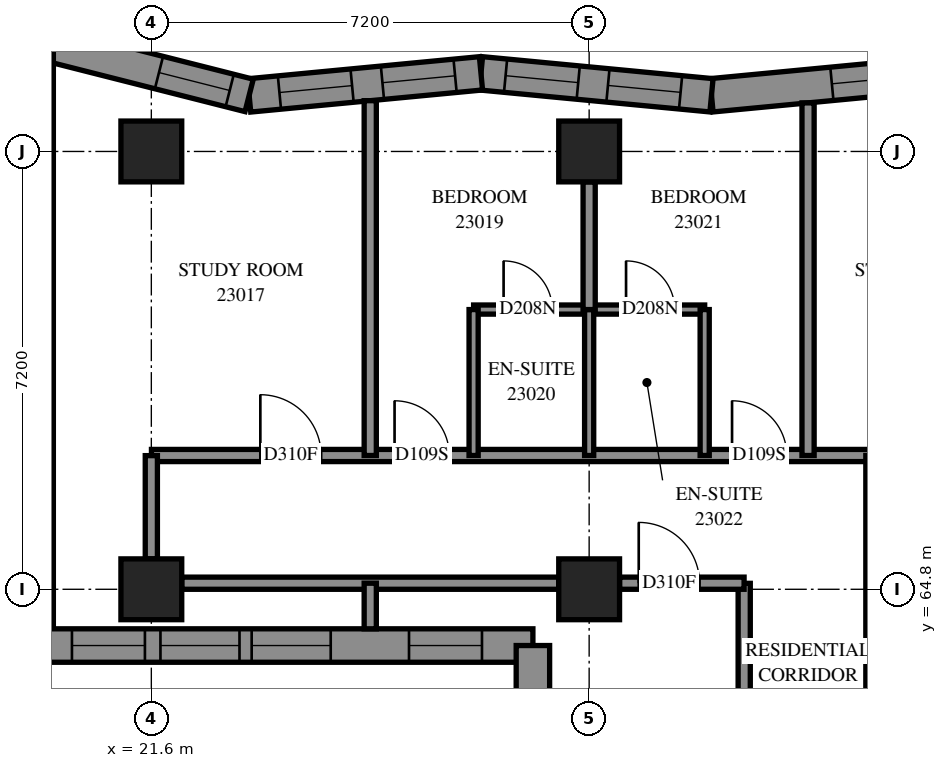
"""IFC4 building model, lengths in metres.
Left out: names, types, materials, properties, quantities, classifications, styles, units other than length and angle.
Written with IfcOpenShell. Run it as: python <this file> out.ifc"""

import sys

from ifc_helpers import new_model, si_unit, direction, frame, frame_2d, origin, origin_2d, place, context, subcontext, project, spatial, polyline, rectangle, outline, extrude, element, fill, save


model = new_model("IFC4")
c1 = context("Model", 3, precision=1e-05, world=origin(), true_north=direction((0.0, 1.0)))
c2 = subcontext(c1, "Body", "Model", "MODEL_VIEW")
j1 = project(units=[si_unit("LENGTHUNIT", "METRE"), si_unit("PLANEANGLEUNIT", "RADIAN")], contexts=[c1])
p1 = place(None, origin())
s1 = spatial("IfcSite", under=j1, at=p1, CompositionType="ELEMENT")
p2 = place(p1, origin())
s2 = spatial("IfcBuilding", under=s1, at=p2, CompositionType="ELEMENT")
p3 = place(p2, frame((0.0, 0.0, 88.0)))
s3 = spatial("IfcBuildingStorey", under=s2, at=p3, CompositionType="ELEMENT", Elevation=88.0)
for number, where, z_axis, x_axis in (
    (1, (21.6, 64.8, 0.0), (0.0, 0.0, 1.0), (1.0, 0.0, 0.0)),
    (2, (21.6, 72.0, 0.0), (0.0, 0.0, 1.0), (1.0, 0.0, 0.0)),
    (3, (28.8, 64.8, 0.0), (0.0, 0.0, 1.0), (1.0, 0.0, 0.0)),
    (4, (28.8, 72.0, 0.0), (0.0, 0.0, 1.0), (1.0, 0.0, 0.0)),
):
    element("IfcColumn", number, at=place(p3, frame(where, z_axis=z_axis, x_axis=x_axis)), inside=s3, PredefinedType="COLUMN", context=c2, shape_type="SweptSolid", body=[
        extrude(rectangle(XDim=1.0, YDim=1.0, at=origin_2d()), origin(), (0.0, 0.0, 1.0), 3.1),
    ])
p4 = place(p3, frame((34.603, 73.285, 0.0), z_axis=(0.0, 0.0, 1.0), x_axis=(-0.9954966527, -0.0947967005, 0.0)))
e5 = element("IfcWall", 5, at=p4, inside=s3, PredefinedType="SOLIDWALL", context=c2, shape_type="SweptSolid", body=[
    extrude(outline(polyline([(-0.026, -0.275), (3.782, -0.275), (3.834, 0.275), (0.026, 0.275), (-0.026, -0.275)])), origin(), (0.0, 0.0, 1.0), 3.1),
])
p5 = place(p4, frame((0.62, 0.0, 0.5)))
e6 = element("IfcOpeningElement", 6, at=p5, cuts=e5, PredefinedType="OPENING", context=c2, shape_type="SweptSolid", body=[
    extrude(rectangle(XDim=1.2, YDim=2.45, at=frame_2d((0.6, 1.225))), frame((0.0, 0.285, 0.0), z_axis=(0.0, -1.0, 0.0), x_axis=(1.0, 0.0, 0.0)), (0.0, 0.0, 1.0), 0.57),
])
p6 = place(p3, frame((30.812, 72.924, 0.0), z_axis=(0.0, 0.0, 1.0), x_axis=(-0.9954966527, 0.0947967005, 0.0)))
e7 = element("IfcWall", 7, at=p6, inside=s3, PredefinedType="SOLIDWALL", context=c2, shape_type="SweptSolid", body=[
    extrude(outline(polyline([(0.026, -0.275), (3.834, -0.275), (3.782, 0.275), (-0.026, 0.275), (0.026, -0.275)])), origin(), (0.0, 0.0, 1.0), 3.1),
])
p7 = place(p6, frame((0.511, 0.0, 0.5)))
e8 = element("IfcOpeningElement", 8, at=p7, cuts=e7, PredefinedType="OPENING", context=c2, shape_type="SweptSolid", body=[
    extrude(rectangle(XDim=1.2, YDim=2.45, at=frame_2d((0.6, 1.225))), frame((0.0, 0.285, 0.0), z_axis=(0.0, -1.0, 0.0), x_axis=(1.0, 0.0, 0.0)), (0.0, 0.0, 1.0), 0.57),
])
p8 = place(p6, frame((2.202, 0.0, 0.5)))
e9 = element("IfcOpeningElement", 9, at=p8, cuts=e7, PredefinedType="OPENING", context=c2, shape_type="SweptSolid", body=[
    extrude(rectangle(XDim=1.2, YDim=2.45, at=frame_2d((0.6, 1.225))), frame((0.0, 0.285, 0.0), z_axis=(0.0, -1.0, 0.0), x_axis=(1.0, 0.0, 0.0)), (0.0, 0.0, 1.0), 0.57),
])
p9 = place(p3, frame((27.021, 73.285, 0.0), z_axis=(0.0, 0.0, 1.0), x_axis=(-0.9954951205, -0.0948127894, 0.0)))
e10 = element("IfcWall", 10, at=p9, inside=s3, PredefinedType="SOLIDWALL", context=c2, shape_type="SweptSolid", body=[
    extrude(outline(polyline([(-0.026, -0.275), (3.782, -0.275), (3.877, 0.275), (0.026, 0.275), (-0.026, -0.275)])), origin(), (0.0, 0.0, 1.0), 3.1),
])
p10 = place(p9, frame((0.428, 0.0, 0.5)))
e11 = element("IfcOpeningElement", 11, at=p10, cuts=e10, PredefinedType="OPENING", context=c2, shape_type="SweptSolid", body=[
    extrude(rectangle(XDim=1.2, YDim=2.45, at=frame_2d((0.6, 1.225))), frame((0.0, 0.285, 0.0), z_axis=(0.0, -1.0, 0.0), x_axis=(1.0, 0.0, 0.0)), (0.0, 0.0, 1.0), 0.57),
])
p11 = place(p9, frame((2.129, 0.0, 0.5)))
e12 = element("IfcOpeningElement", 12, at=p11, cuts=e10, PredefinedType="OPENING", context=c2, shape_type="SweptSolid", body=[
    extrude(rectangle(XDim=1.2, YDim=2.45, at=frame_2d((0.6, 1.225))), frame((0.0, 0.285, 0.0), z_axis=(0.0, -1.0, 0.0), x_axis=(1.0, 0.0, 0.0)), (0.0, 0.0, 1.0), 0.57),
])
p12 = place(p3, frame((23.209, 72.922, 0.0), z_axis=(0.0, 0.0, 1.0), x_axis=(-0.9693377173, 0.2457323539, 0.0)))
e13 = element("IfcWall", 13, at=p12, inside=s3, PredefinedType="SOLIDWALL", context=c2, shape_type="SweptSolid", body=[
    extrude(outline(polyline([(0.048, -0.275), (3.959, -0.275), (3.252, 0.275), (-0.048, 0.275), (0.048, -0.275)])), origin(), (0.0, 0.0, 1.0), 3.1),
])
p13 = place(p12, frame((0.33, 0.0, 0.5)))
e14 = element("IfcOpeningElement", 14, at=p13, cuts=e13, PredefinedType="OPENING", context=c2, shape_type="SweptSolid", body=[
    extrude(rectangle(XDim=1.2, YDim=2.45, at=frame_2d((0.6, 1.225))), frame((0.0, 0.285, 0.0), z_axis=(0.0, -1.0, 0.0), x_axis=(1.0, 0.0, 0.0)), (0.0, 0.0, 1.0), 0.57),
])
p14 = place(p3, frame((19.714, 73.808, 0.0), z_axis=(0.0, 0.0, 1.0), x_axis=(0.0, -1.0, 0.0)))
e15 = element("IfcWall", 15, at=p14, inside=s3, PredefinedType="SOLIDWALL", context=c2, shape_type="SweptSolid", body=[
    extrude(outline(polyline([(-0.353, -0.275), (10.208, -0.275), (9.658, 0.275), (0.353, 0.275), (-0.353, -0.275)])), origin(), (0.0, 0.0, 1.0), 3.1),
])
p15 = place(p14, frame((2.208, 0.0, 0.5)))
e16 = element("IfcOpeningElement", 16, at=p15, cuts=e15, PredefinedType="OPENING", context=c2, shape_type="SweptSolid", body=[
    extrude(rectangle(XDim=1.3, YDim=2.45, at=frame_2d((0.65, 1.225))), frame((0.0, 0.285, 0.0), z_axis=(0.0, -1.0, 0.0), x_axis=(1.0, 0.0, 0.0)), (0.0, 0.0, 1.0), 0.57),
])
p16 = place(p14, frame((3.708, 0.0, 0.5)))
e17 = element("IfcOpeningElement", 17, at=p16, cuts=e15, PredefinedType="OPENING", context=c2, shape_type="SweptSolid", body=[
    extrude(rectangle(XDim=1.3, YDim=2.45, at=frame_2d((0.65, 1.225))), frame((0.0, 0.285, 0.0), z_axis=(0.0, -1.0, 0.0), x_axis=(1.0, 0.0, 0.0)), (0.0, 0.0, 1.0), 0.57),
])
p17 = place(p14, frame((5.958, 0.0, 0.5)))
e18 = element("IfcOpeningElement", 18, at=p17, cuts=e15, PredefinedType="OPENING", context=c2, shape_type="SweptSolid", body=[
    extrude(rectangle(XDim=1.3, YDim=2.45, at=frame_2d((0.65, 1.225))), frame((0.0, 0.285, 0.0), z_axis=(0.0, -1.0, 0.0), x_axis=(1.0, 0.0, 0.0)), (0.0, 0.0, 1.0), 0.57),
])
p18 = place(p14, frame((7.458, 0.0, 0.5)))
e19 = element("IfcOpeningElement", 19, at=p18, cuts=e15, PredefinedType="OPENING", context=c2, shape_type="SweptSolid", body=[
    extrude(rectangle(XDim=1.3, YDim=2.45, at=frame_2d((0.65, 1.225))), frame((0.0, 0.285, 0.0), z_axis=(0.0, -1.0, 0.0), x_axis=(1.0, 0.0, 0.0)), (0.0, 0.0, 1.0), 0.57),
])
p19 = place(p3, frame((19.714, 63.875, 0.0), z_axis=(0.0, 0.0, 1.0), x_axis=(1.0, 0.0, 0.0)))
e20 = element("IfcWall", 20, at=p19, inside=s3, PredefinedType="SOLIDWALL", context=c2, shape_type="SweptSolid", body=[
    extrude(outline(polyline([(-0.275, -0.275), (7.886, -0.275), (8.436, 0.275), (0.275, 0.275), (-0.275, -0.275)])), origin(), (0.0, 0.0, 1.0), 3.1),
])
p20 = place(p19, frame((2.036, 0.0, 0.5)))
e21 = element("IfcOpeningElement", 21, at=p20, cuts=e20, PredefinedType="OPENING", context=c2, shape_type="SweptSolid", body=[
    extrude(rectangle(XDim=1.3, YDim=2.45, at=frame_2d((0.65, 1.225))), frame((0.0, 0.285, 0.0), z_axis=(0.0, -1.0, 0.0), x_axis=(1.0, 0.0, 0.0)), (0.0, 0.0, 1.0), 0.57),
])
p21 = place(p19, frame((3.536, 0.0, 0.5)))
e22 = element("IfcOpeningElement", 22, at=p21, cuts=e20, PredefinedType="OPENING", context=c2, shape_type="SweptSolid", body=[
    extrude(rectangle(XDim=1.3, YDim=2.45, at=frame_2d((0.65, 1.225))), frame((0.0, 0.285, 0.0), z_axis=(0.0, -1.0, 0.0), x_axis=(1.0, 0.0, 0.0)), (0.0, 0.0, 1.0), 0.57),
])
p22 = place(p19, frame((0.581, 0.0, 0.5)))
e23 = element("IfcOpeningElement", 23, at=p22, cuts=e20, PredefinedType="OPENING", context=c2, shape_type="SweptSolid", body=[
    extrude(rectangle(XDim=1.2, YDim=2.45, at=frame_2d((0.6, 1.225))), frame((0.0, 0.285, 0.0), z_axis=(0.0, -1.0, 0.0), x_axis=(1.0, 0.0, 0.0)), (0.0, 0.0, 1.0), 0.57),
])
p23 = place(p19, frame((6.123, 0.0, 0.5)))
e24 = element("IfcOpeningElement", 24, at=p23, cuts=e20, PredefinedType="OPENING", context=c2, shape_type="SweptSolid", body=[
    extrude(rectangle(XDim=1.2, YDim=2.45, at=frame_2d((0.6, 1.225))), frame((0.0, 0.285, 0.0), z_axis=(0.0, -1.0, 0.0), x_axis=(1.0, 0.0, 0.0)), (0.0, 0.0, 1.0), 0.57),
])
p24 = place(p3, frame((27.875, 63.875, 0.0), z_axis=(0.0, 0.0, 1.0), x_axis=(0.0, -1.0, 0.0)))
e25 = element("IfcWall", 25, at=p24, inside=s3, PredefinedType="SOLIDWALL", context=c2, shape_type="SweptSolid", body=[
    extrude(outline(polyline([(0.275, -0.275), (8.436, -0.275), (7.886, 0.275), (-0.275, 0.275), (0.275, -0.275)])), origin(), (0.0, 0.0, 1.0), 3.1),
])
p25 = place(p24, frame((4.825, 0.0, 0.5)))
e26 = element("IfcOpeningElement", 26, at=p25, cuts=e25, PredefinedType="OPENING", context=c2, shape_type="SweptSolid", body=[
    extrude(rectangle(XDim=1.3, YDim=2.45, at=frame_2d((0.65, 1.225))), frame((0.0, 0.285, 0.0), z_axis=(0.0, -1.0, 0.0), x_axis=(1.0, 0.0, 0.0)), (0.0, 0.0, 1.0), 0.57),
])
p26 = place(p24, frame((1.738, 0.0, 0.5)))
e27 = element("IfcOpeningElement", 27, at=p26, cuts=e25, PredefinedType="OPENING", context=c2, shape_type="SweptSolid", body=[
    extrude(rectangle(XDim=1.2, YDim=2.45, at=frame_2d((0.6, 1.225))), frame((0.0, 0.285, 0.0), z_axis=(0.0, -1.0, 0.0), x_axis=(1.0, 0.0, 0.0)), (0.0, 0.0, 1.0), 0.57),
])
p27 = place(p24, frame((6.38, 0.0, 0.5)))
e28 = element("IfcOpeningElement", 28, at=p27, cuts=e25, PredefinedType="OPENING", context=c2, shape_type="SweptSolid", body=[
    extrude(rectangle(XDim=1.2, YDim=2.45, at=frame_2d((0.6, 1.225))), frame((0.0, 0.285, 0.0), z_axis=(0.0, -1.0, 0.0), x_axis=(1.0, 0.0, 0.0)), (0.0, 0.0, 1.0), 0.57),
])
p28 = place(p24, frame((3.9, 0.0, 0.45)))
e29 = element("IfcOpeningElement", 29, at=p28, cuts=e25, PredefinedType="OPENING", context=c2, shape_type="SweptSolid", body=[
    extrude(rectangle(XDim=0.8, YDim=2.5, at=frame_2d((0.4, 1.25))), frame((0.0, 0.285, 0.0), z_axis=(0.0, -1.0, 0.0), x_axis=(1.0, 0.0, 0.0)), (0.0, 0.0, 1.0), 0.57),
])
p29 = place(p3, frame((21.602, 67.0, 0.0), z_axis=(0.0, 0.0, 1.0), x_axis=(1.0, 0.0, 0.0)))
e30 = element("IfcWall", 30, at=p29, inside=s3, PredefinedType="PARTITIONING", context=c2, shape_type="SweptSolid", body=[
    extrude(rectangle(XDim=11.848, YDim=0.2, at=frame_2d((5.924, 0.0))), origin(), (0.0, 0.0, 1.0), 3.1),
])
p30 = place(p29, frame((1.791, 0.0, 0.0)))
e31 = element("IfcOpeningElement", 31, at=p30, cuts=e30, PredefinedType="OPENING", context=c2, shape_type="SweptSolid", body=[
    extrude(rectangle(XDim=1.0, YDim=2.1, at=frame_2d((0.5, 1.05))), frame((0.0, 0.11, 0.0), z_axis=(0.0, -1.0, 0.0), x_axis=(1.0, 0.0, 0.0)), (0.0, 0.0, 1.0), 0.22),
])
p31 = place(p29, frame((3.998, 0.0, 0.0)))
e32 = element("IfcOpeningElement", 32, at=p31, cuts=e30, PredefinedType="OPENING", context=c2, shape_type="SweptSolid", body=[
    extrude(rectangle(XDim=0.9, YDim=2.1, at=frame_2d((0.45, 1.05))), frame((0.0, 0.11, 0.0), z_axis=(0.0, -1.0, 0.0), x_axis=(1.0, 0.0, 0.0)), (0.0, 0.0, 1.0), 0.22),
])
p32 = place(p29, frame((9.548, 0.0, 0.0)))
e33 = element("IfcOpeningElement", 33, at=p32, cuts=e30, PredefinedType="OPENING", context=c2, shape_type="SweptSolid", body=[
    extrude(rectangle(XDim=0.9, YDim=2.1, at=frame_2d((0.45, 1.05))), frame((0.0, 0.11, 0.0), z_axis=(0.0, -1.0, 0.0), x_axis=(1.0, 0.0, 0.0)), (0.0, 0.0, 1.0), 0.22),
])
p33 = place(p3, frame((22.1, 64.9, 0.0), z_axis=(0.0, 0.0, 1.0), x_axis=(1.0, 0.0, 0.0)))
e34 = element("IfcWall", 34, at=p33, inside=s3, PredefinedType="PARTITIONING", context=c2, shape_type="SweptSolid", body=[
    extrude(rectangle(XDim=6.2, YDim=0.2, at=frame_2d((3.1, 0.0))), origin(), (0.0, 0.0, 1.0), 2.6),
])
p34 = place(p3, frame((25.2, 67.0, 0.0), z_axis=(0.0, 0.0, 1.0), x_axis=(0.0, 1.0, 0.0)))
e35 = element("IfcWall", 35, at=p34, inside=s3, PredefinedType="PARTITIONING", context=c2, shape_type="SweptSolid", body=[
    extrude(rectangle(XDim=5.835, YDim=0.2, at=frame_2d((2.917, 0.0))), origin(), (0.0, 0.0, 1.0), 3.1),
])
p35 = place(p3, frame((32.4, 67.0, 0.0), z_axis=(0.0, 0.0, 1.0), x_axis=(0.0, 1.0, 0.0)))
e36 = element("IfcWall", 36, at=p35, inside=s3, PredefinedType="PARTITIONING", context=c2, shape_type="SweptSolid", body=[
    extrude(rectangle(XDim=5.799, YDim=0.2, at=frame_2d((2.899, 0.0))), origin(), (0.0, 0.0, 1.0), 3.1),
])
p36 = place(p3, frame((33.45, 62.252, 0.0), z_axis=(0.0, 0.0, 1.0), x_axis=(0.0, 1.0, 0.0)))
e37 = element("IfcWall", 37, at=p36, inside=s3, PredefinedType="PARTITIONING", context=c2, shape_type="SweptSolid", body=[
    extrude(rectangle(XDim=4.748, YDim=0.2, at=frame_2d((2.374, 0.0))), origin(), (0.0, 0.0, 1.0), 3.1),
])
p37 = place(p3, frame((26.9, 69.4, 0.0), z_axis=(0.0, 0.0, 1.0), x_axis=(1.0, 0.0, 0.0)))
e38 = element("IfcWall", 38, at=p37, inside=s3, PredefinedType="PARTITIONING", context=c2, shape_type="SweptSolid", body=[
    extrude(rectangle(XDim=3.8, YDim=0.15, at=frame_2d((1.9, 0.0))), origin(), (0.0, 0.0, 1.0), 3.1),
])
p38 = place(p37, frame((0.493, 0.0, 0.0)))
e39 = element("IfcOpeningElement", 39, at=p38, cuts=e38, PredefinedType="OPENING", context=c2, shape_type="SweptSolid", body=[
    extrude(rectangle(XDim=0.8, YDim=2.1, at=frame_2d((0.4, 1.05))), frame((0.0, 0.085, 0.0), z_axis=(0.0, -1.0, 0.0), x_axis=(1.0, 0.0, 0.0)), (0.0, 0.0, 1.0), 0.17),
])
p39 = place(p37, frame((2.507, 0.0, 0.0)))
e40 = element("IfcOpeningElement", 40, at=p39, cuts=e38, PredefinedType="OPENING", context=c2, shape_type="SweptSolid", body=[
    extrude(rectangle(XDim=0.8, YDim=2.1, at=frame_2d((0.4, 1.05))), frame((0.0, 0.085, 0.0), z_axis=(0.0, -1.0, 0.0), x_axis=(1.0, 0.0, 0.0)), (0.0, 0.0, 1.0), 0.17),
])
p40 = place(p3, frame((31.35, 62.252, 0.0), z_axis=(0.0, 0.0, 1.0), x_axis=(0.0, 1.0, 0.0)))
e41 = element("IfcWall", 41, at=p40, inside=s3, PredefinedType="PARTITIONING", context=c2, shape_type="SweptSolid", body=[
    extrude(rectangle(XDim=2.646, YDim=0.2, at=frame_2d((1.323, 0.0))), origin(), (0.0, 0.0, 1.0), 3.1),
])
for number, where, z_axis, x_axis in (
    (42, (26.9, 67.0, 0.0), (0.0, 0.0, 1.0), (0.0, 1.0, 0.0)),
    (43, (28.8, 67.0, 0.0), (0.0, 0.0, 1.0), (0.0, 1.0, 0.0)),
    (44, (30.7, 67.0, 0.0), (0.0, 0.0, 1.0), (0.0, 1.0, 0.0)),
):
    element("IfcWall", number, at=place(p3, frame(where, z_axis=z_axis, x_axis=x_axis)), inside=s3, PredefinedType="PARTITIONING", context=c2, shape_type="SweptSolid", body=[
        extrude(rectangle(XDim=2.4, YDim=0.15, at=frame_2d((1.2, 0.0))), origin(), (0.0, 0.0, 1.0), 3.1),
    ])
p41 = place(p3, frame((28.8, 69.4, 0.0), z_axis=(0.0, 0.0, 1.0), x_axis=(0.0, 1.0, 0.0)))
e45 = element("IfcWall", 45, at=p41, inside=s3, PredefinedType="PARTITIONING", context=c2, shape_type="SweptSolid", body=[
    extrude(rectangle(XDim=2.1, YDim=0.2, at=frame_2d((1.05, 0.0))), origin(), (0.0, 0.0, 1.0), 3.1),
])
p42 = place(p3, frame((29.3, 64.9, 0.0), z_axis=(0.0, 0.0, 1.0), x_axis=(1.0, 0.0, 0.0)))
e46 = element("IfcWall", 46, at=p42, inside=s3, PredefinedType="PARTITIONING", context=c2, shape_type="SweptSolid", body=[
    extrude(rectangle(XDim=2.048, YDim=0.2, at=frame_2d((1.024, 0.0))), origin(), (0.0, 0.0, 1.0), 3.1),
])
p43 = place(p42, frame((0.316, 0.0, 0.0)))
e47 = element("IfcOpeningElement", 47, at=p43, cuts=e46, PredefinedType="OPENING", context=c2, shape_type="SweptSolid", body=[
    extrude(rectangle(XDim=1.0, YDim=2.1, at=frame_2d((0.5, 1.05))), frame((0.0, 0.11, 0.0), z_axis=(0.0, -1.0, 0.0), x_axis=(1.0, 0.0, 0.0)), (0.0, 0.0, 1.0), 0.22),
])
p44 = place(p3, frame((21.6, 65.3, 0.0), z_axis=(0.0, 0.0, 1.0), x_axis=(0.0, 1.0, 0.0)))
e48 = element("IfcWall", 48, at=p44, inside=s3, PredefinedType="PARTITIONING", context=c2, shape_type="SweptSolid", body=[
    extrude(rectangle(XDim=1.698, YDim=0.2, at=frame_2d((0.849, 0.0))), origin(), (0.0, 0.0, 1.0), 2.6),
])
p45 = place(p3, frame((25.2, 64.15, 0.0), z_axis=(0.0, 0.0, 1.0), x_axis=(0.0, 1.0, 0.0)))
e49 = element("IfcWall", 49, at=p45, inside=s3, PredefinedType="PARTITIONING", context=c2, shape_type="SweptSolid", body=[
    extrude(rectangle(XDim=0.75, YDim=0.2, at=frame_2d((0.375, 0.0))), origin(), (0.0, 0.0, 1.0), 3.1),
])
p46 = place(p5, origin())
e50 = element("IfcWindow", 50, at=p46, inside=s3, PartitioningType="SINGLE_PANEL", PredefinedType="WINDOW", context=c2, shape_type="SweptSolid", body=[
    extrude(rectangle(XDim=1.2, YDim=2.45, at=frame_2d((0.6, 1.225))), frame((0.0, 0.155, 0.0), z_axis=(0.0, -1.0, 0.0), x_axis=(1.0, 0.0, 0.0)), (0.0, 0.0, 1.0), 0.06),
])
fill(e6, e50)
p47 = place(p7, origin())
e51 = element("IfcWindow", 51, at=p47, inside=s3, PartitioningType="SINGLE_PANEL", PredefinedType="WINDOW", context=c2, shape_type="SweptSolid", body=[
    extrude(rectangle(XDim=1.2, YDim=2.45, at=frame_2d((0.6, 1.225))), frame((0.0, 0.155, 0.0), z_axis=(0.0, -1.0, 0.0), x_axis=(1.0, 0.0, 0.0)), (0.0, 0.0, 1.0), 0.06),
])
fill(e8, e51)
p48 = place(p8, origin())
e52 = element("IfcWindow", 52, at=p48, inside=s3, PartitioningType="SINGLE_PANEL", PredefinedType="WINDOW", context=c2, shape_type="SweptSolid", body=[
    extrude(rectangle(XDim=1.2, YDim=2.45, at=frame_2d((0.6, 1.225))), frame((0.0, 0.155, 0.0), z_axis=(0.0, -1.0, 0.0), x_axis=(1.0, 0.0, 0.0)), (0.0, 0.0, 1.0), 0.06),
])
fill(e9, e52)
p49 = place(p10, origin())
e53 = element("IfcWindow", 53, at=p49, inside=s3, PartitioningType="SINGLE_PANEL", PredefinedType="WINDOW", context=c2, shape_type="SweptSolid", body=[
    extrude(rectangle(XDim=1.2, YDim=2.45, at=frame_2d((0.6, 1.225))), frame((0.0, 0.155, 0.0), z_axis=(0.0, -1.0, 0.0), x_axis=(1.0, 0.0, 0.0)), (0.0, 0.0, 1.0), 0.06),
])
fill(e11, e53)
p50 = place(p11, origin())
e54 = element("IfcWindow", 54, at=p50, inside=s3, PartitioningType="SINGLE_PANEL", PredefinedType="WINDOW", context=c2, shape_type="SweptSolid", body=[
    extrude(rectangle(XDim=1.2, YDim=2.45, at=frame_2d((0.6, 1.225))), frame((0.0, 0.155, 0.0), z_axis=(0.0, -1.0, 0.0), x_axis=(1.0, 0.0, 0.0)), (0.0, 0.0, 1.0), 0.06),
])
fill(e12, e54)
p51 = place(p13, origin())
e55 = element("IfcWindow", 55, at=p51, inside=s3, PartitioningType="SINGLE_PANEL", PredefinedType="WINDOW", context=c2, shape_type="SweptSolid", body=[
    extrude(rectangle(XDim=1.2, YDim=2.45, at=frame_2d((0.6, 1.225))), frame((0.0, 0.155, 0.0), z_axis=(0.0, -1.0, 0.0), x_axis=(1.0, 0.0, 0.0)), (0.0, 0.0, 1.0), 0.06),
])
fill(e14, e55)
p52 = place(p20, origin())
e56 = element("IfcWindow", 56, at=p52, inside=s3, PartitioningType="SINGLE_PANEL", PredefinedType="WINDOW", context=c2, shape_type="SweptSolid", body=[
    extrude(rectangle(XDim=1.3, YDim=2.45, at=frame_2d((0.65, 1.225))), frame((0.0, 0.155, 0.0), z_axis=(0.0, -1.0, 0.0), x_axis=(1.0, 0.0, 0.0)), (0.0, 0.0, 1.0), 0.06),
])
fill(e21, e56)
p53 = place(p21, origin())
e57 = element("IfcWindow", 57, at=p53, inside=s3, PartitioningType="SINGLE_PANEL", PredefinedType="WINDOW", context=c2, shape_type="SweptSolid", body=[
    extrude(rectangle(XDim=1.3, YDim=2.45, at=frame_2d((0.65, 1.225))), frame((0.0, 0.155, 0.0), z_axis=(0.0, -1.0, 0.0), x_axis=(1.0, 0.0, 0.0)), (0.0, 0.0, 1.0), 0.06),
])
fill(e22, e57)
p54 = place(p22, origin())
e58 = element("IfcWindow", 58, at=p54, inside=s3, PartitioningType="SINGLE_PANEL", PredefinedType="WINDOW", context=c2, shape_type="SweptSolid", body=[
    extrude(rectangle(XDim=1.2, YDim=2.45, at=frame_2d((0.6, 1.225))), frame((0.0, 0.155, 0.0), z_axis=(0.0, -1.0, 0.0), x_axis=(1.0, 0.0, 0.0)), (0.0, 0.0, 1.0), 0.06),
])
fill(e23, e58)
p55 = place(p23, origin())
e59 = element("IfcWindow", 59, at=p55, inside=s3, PartitioningType="SINGLE_PANEL", PredefinedType="WINDOW", context=c2, shape_type="SweptSolid", body=[
    extrude(rectangle(XDim=1.2, YDim=2.45, at=frame_2d((0.6, 1.225))), frame((0.0, 0.155, 0.0), z_axis=(0.0, -1.0, 0.0), x_axis=(1.0, 0.0, 0.0)), (0.0, 0.0, 1.0), 0.06),
])
fill(e24, e59)
p56 = place(p30, origin())
e60 = element("IfcDoor", 60, at=p56, inside=s3, OperationType="SINGLE_SWING_RIGHT", PredefinedType="DOOR", context=c2, shape_type="SweptSolid", body=[
    extrude(rectangle(XDim=1.0, YDim=2.1, at=frame_2d((0.5, 1.05))), frame((0.0, 0.025, 0.0), z_axis=(0.0, -1.0, 0.0), x_axis=(1.0, 0.0, 0.0)), (0.0, 0.0, 1.0), 0.05),
])
fill(e31, e60)
p57 = place(p43, origin())
e61 = element("IfcDoor", 61, at=p57, inside=s3, OperationType="SINGLE_SWING_RIGHT", PredefinedType="DOOR", context=c2, shape_type="SweptSolid", body=[
    extrude(rectangle(XDim=1.0, YDim=2.1, at=frame_2d((0.5, 1.05))), frame((0.0, 0.025, 0.0), z_axis=(0.0, -1.0, 0.0), x_axis=(1.0, 0.0, 0.0)), (0.0, 0.0, 1.0), 0.05),
])
fill(e47, e61)
p58 = place(p31, origin())
e62 = element("IfcDoor", 62, at=p58, inside=s3, OperationType="SINGLE_SWING_LEFT", PredefinedType="DOOR", context=c2, shape_type="SweptSolid", body=[
    extrude(rectangle(XDim=0.9, YDim=2.1, at=frame_2d((0.45, 1.05))), frame((0.0, 0.025, 0.0), z_axis=(0.0, -1.0, 0.0), x_axis=(1.0, 0.0, 0.0)), (0.0, 0.0, 1.0), 0.05),
])
fill(e32, e62)
p59 = place(p38, origin())
e63 = element("IfcDoor", 63, at=p59, inside=s3, OperationType="SINGLE_SWING_RIGHT", PredefinedType="DOOR", context=c2, shape_type="SweptSolid", body=[
    extrude(rectangle(XDim=0.8, YDim=2.1, at=frame_2d((0.4, 1.05))), frame((0.0, 0.025, 0.0), z_axis=(0.0, -1.0, 0.0), x_axis=(1.0, 0.0, 0.0)), (0.0, 0.0, 1.0), 0.05),
])
fill(e39, e63)
p60 = place(p32, origin())
e64 = element("IfcDoor", 64, at=p60, inside=s3, OperationType="SINGLE_SWING_RIGHT", PredefinedType="DOOR", context=c2, shape_type="SweptSolid", body=[
    extrude(rectangle(XDim=0.9, YDim=2.1, at=frame_2d((0.45, 1.05))), frame((0.0, 0.025, 0.0), z_axis=(0.0, -1.0, 0.0), x_axis=(1.0, 0.0, 0.0)), (0.0, 0.0, 1.0), 0.05),
])
fill(e33, e64)
p61 = place(p39, origin())
e65 = element("IfcDoor", 65, at=p61, inside=s3, OperationType="SINGLE_SWING_RIGHT", PredefinedType="DOOR", context=c2, shape_type="SweptSolid", body=[
    extrude(rectangle(XDim=0.8, YDim=2.1, at=frame_2d((0.4, 1.05))), frame((0.0, 0.025, 0.0), z_axis=(0.0, -1.0, 0.0), x_axis=(1.0, 0.0, 0.0)), (0.0, 0.0, 1.0), 0.05),
])
fill(e40, e65)
save(model, sys.argv[1])
